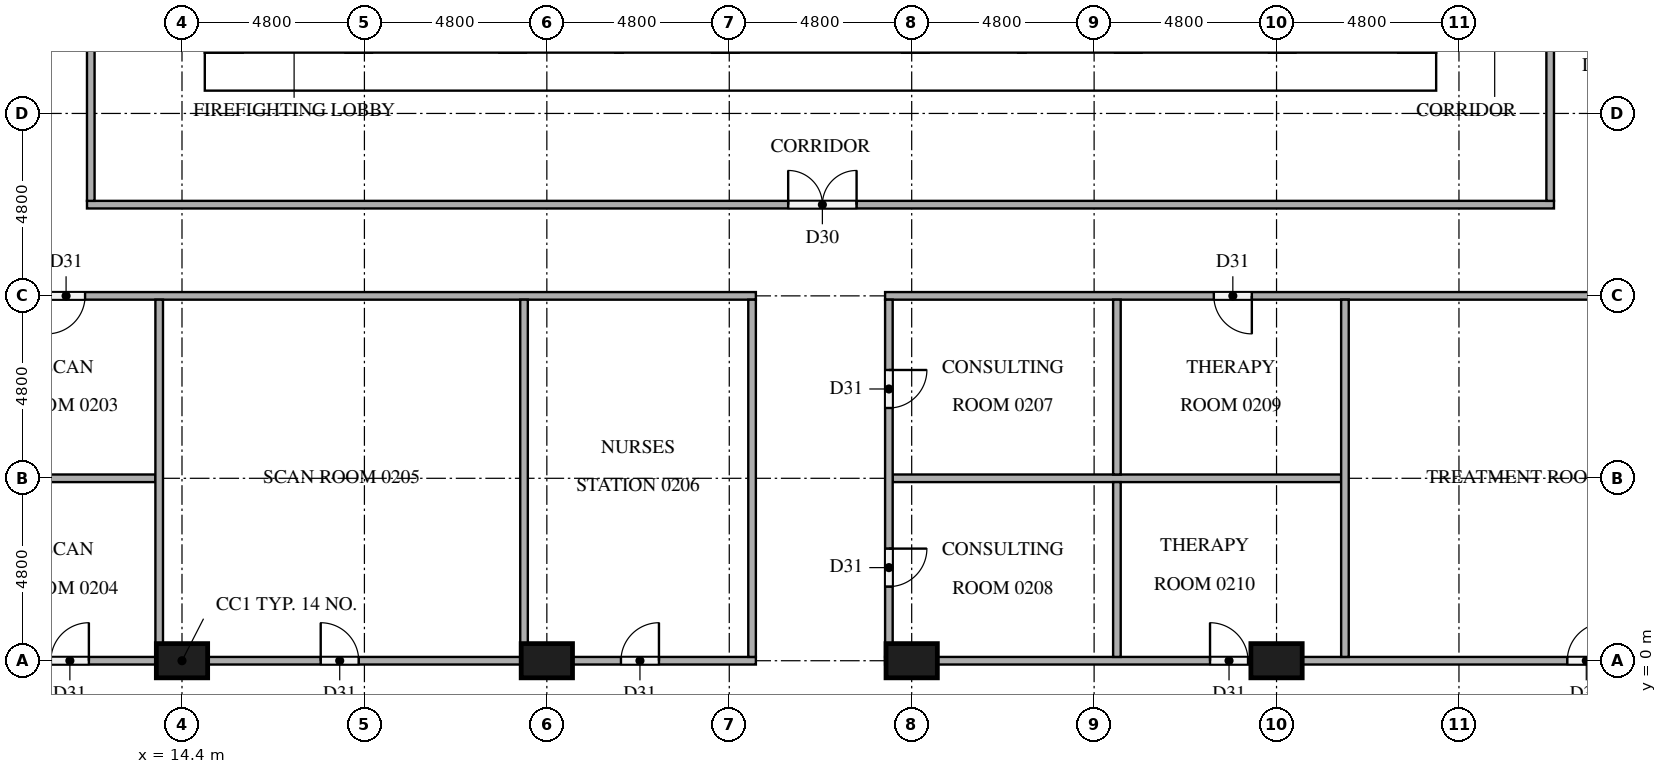
"""IFC4 building model, lengths in metres.
Left out: names, types, materials, properties, quantities, classifications, styles, units other than length and angle.
Written with IfcOpenShell. Run it as: python <this file> out.ifc"""

import sys

from ifc_helpers import new_model, si_unit, direction, frame, frame_2d, origin, origin_2d, place, context, subcontext, project, spatial, rectangle, extrude, element, fill, save


model = new_model("IFC4")
c1 = context("Model", 3, precision=1e-05, world=origin(), true_north=direction((0.0, 1.0)))
c2 = subcontext(c1, "Body", "Model", "MODEL_VIEW")
j1 = project(units=[si_unit("LENGTHUNIT", "METRE"), si_unit("PLANEANGLEUNIT", "RADIAN")], contexts=[c1])
p1 = place(None, origin())
s1 = spatial("IfcSite", under=j1, at=p1, CompositionType="ELEMENT")
p2 = place(p1, origin())
s2 = spatial("IfcBuilding", under=s1, at=p2, CompositionType="ELEMENT")
p3 = place(p2, frame((0.0, 0.0, 10.5)))
s3 = spatial("IfcBuildingStorey", under=s2, at=p3, CompositionType="ELEMENT", Elevation=10.5)
p4 = place(p3, frame((15.0, 15.5, 0.0), z_axis=(0.0, 0.0, 1.0), x_axis=(1.0, 0.0, 0.0)))
e1 = element("IfcWall", 1, at=p4, inside=s3, PredefinedType="SHEAR", context=c2, shape_type="SweptSolid", body=[
    extrude(rectangle(XDim=32.4, YDim=1.0, at=frame_2d((16.2, 0.0))), origin(), (0.0, 0.0, 1.0), 4.2),
])
p5 = place(p4, frame((15.3, 0.0, 0.0)))
e2 = element("IfcOpeningElement", 2, at=p5, cuts=e1, PredefinedType="OPENING", context=c2, shape_type="SweptSolid", body=[
    extrude(rectangle(XDim=1.8, YDim=2.1, at=frame_2d((0.9, 1.05))), frame((0.0, 0.51, 0.0), z_axis=(0.0, -1.0, 0.0), x_axis=(1.0, 0.0, 0.0)), (0.0, 0.0, 1.0), 1.02),
])
p6 = place(p3, frame((15.5, 16.0, 0.0), z_axis=(0.0, 0.0, 1.0), x_axis=(0.0, 1.0, 0.0)))
e3 = element("IfcWall", 3, at=p6, inside=s3, PredefinedType="SHEAR", context=c2, shape_type="SweptSolid", body=[
    extrude(rectangle(XDim=20.8, YDim=1.0, at=frame_2d((10.4, 0.0))), origin(), (0.0, 0.0, 1.0), 4.2),
])
p7 = place(p6, frame((4.76, 0.0, 0.0)))
e4 = element("IfcOpeningElement", 4, at=p7, cuts=e3, PredefinedType="OPENING", context=c2, shape_type="SweptSolid", body=[
    extrude(rectangle(XDim=1.2, YDim=2.1, at=frame_2d((0.6, 1.05))), frame((0.0, 0.51, 0.0), z_axis=(0.0, -1.0, 0.0), x_axis=(1.0, 0.0, 0.0)), (0.0, 0.0, 1.0), 1.02),
])
p8 = place(p3, frame((46.9, 16.0, 0.0), z_axis=(0.0, 0.0, 1.0), x_axis=(0.0, 1.0, 0.0)))
e5 = element("IfcWall", 5, at=p8, inside=s3, PredefinedType="SHEAR", context=c2, shape_type="SweptSolid", body=[
    extrude(rectangle(XDim=20.8, YDim=1.0, at=frame_2d((10.4, 0.0))), origin(), (0.0, 0.0, 1.0), 4.2),
])
p9 = place(p8, frame((10.1, 0.0, 0.0)))
e6 = element("IfcOpeningElement", 6, at=p9, cuts=e5, PredefinedType="OPENING", context=c2, shape_type="SweptSolid", body=[
    extrude(rectangle(XDim=1.2, YDim=2.1, at=frame_2d((0.6, 1.05))), frame((0.0, 0.51, 0.0), z_axis=(0.0, -1.0, 0.0), x_axis=(1.0, 0.0, 0.0)), (0.0, 0.0, 1.0), 1.02),
])
p10 = place(p3, frame((23.1, 16.0, 0.0), z_axis=(0.0, 0.0, 1.0), x_axis=(0.0, 1.0, 0.0)))
e7 = element("IfcWall", 7, at=p10, inside=s3, PredefinedType="SHEAR", context=c2, shape_type="SweptSolid", body=[
    extrude(rectangle(XDim=20.8, YDim=0.7, at=frame_2d((10.4, 0.0))), origin(), (0.0, 0.0, 1.0), 4.2),
])
for number, where, z_axis, x_axis in (
    (8, (14.4, 0.0, 0.0), (0.0, 0.0, 1.0), (1.0, 0.0, 0.0)),
    (9, (24.0, 0.0, 0.0), (0.0, 0.0, 1.0), (1.0, 0.0, 0.0)),
    (10, (33.6, 0.0, 0.0), (0.0, 0.0, 1.0), (1.0, 0.0, 0.0)),
    (11, (43.2, 0.0, 0.0), (0.0, 0.0, 1.0), (1.0, 0.0, 0.0)),
):
    element("IfcColumn", number, at=place(p3, frame(where, z_axis=z_axis, x_axis=x_axis)), inside=s3, PredefinedType="COLUMN", context=c2, shape_type="SweptSolid", body=[
        extrude(rectangle(XDim=1.35, YDim=0.9, at=origin_2d()), origin(), (0.0, 0.0, 1.0), 4.2),
    ])
p11 = place(p3, frame((-1.85, 0.0, 0.0), z_axis=(0.0, 0.0, 1.0), x_axis=(1.0, 0.0, 0.0)))
e12 = element("IfcWall", 12, at=p11, inside=s3, PredefinedType="PARTITIONING", context=c2, shape_type="SweptSolid", body=[
    extrude(rectangle(XDim=31.35, YDim=0.2, at=frame_2d((15.675, 0.0))), origin(), (0.0, 0.0, 1.0), 4.2),
])
p12 = place(p11, frame((12.8, 0.0, 0.0)))
e13 = element("IfcOpeningElement", 13, at=p12, cuts=e12, PredefinedType="OPENING", context=c2, shape_type="SweptSolid", body=[
    extrude(rectangle(XDim=1.0, YDim=2.1, at=frame_2d((0.5, 1.05))), frame((0.0, 0.11, 0.0), z_axis=(0.0, -1.0, 0.0), x_axis=(1.0, 0.0, 0.0)), (0.0, 0.0, 1.0), 0.22),
])
p13 = place(p11, frame((19.9, 0.0, 0.0)))
e14 = element("IfcOpeningElement", 14, at=p13, cuts=e12, PredefinedType="OPENING", context=c2, shape_type="SweptSolid", body=[
    extrude(rectangle(XDim=1.0, YDim=2.1, at=frame_2d((0.5, 1.05))), frame((0.0, 0.11, 0.0), z_axis=(0.0, -1.0, 0.0), x_axis=(1.0, 0.0, 0.0)), (0.0, 0.0, 1.0), 0.22),
])
p14 = place(p11, frame((27.8, 0.0, 0.0)))
e15 = element("IfcOpeningElement", 15, at=p14, cuts=e12, PredefinedType="OPENING", context=c2, shape_type="SweptSolid", body=[
    extrude(rectangle(XDim=1.0, YDim=2.1, at=frame_2d((0.5, 1.05))), frame((0.0, 0.11, 0.0), z_axis=(0.0, -1.0, 0.0), x_axis=(1.0, 0.0, 0.0)), (0.0, 0.0, 1.0), 0.22),
])
p15 = place(p3, frame((32.9, 0.0, 0.0), z_axis=(0.0, 0.0, 1.0), x_axis=(1.0, 0.0, 0.0)))
e16 = element("IfcWall", 16, at=p15, inside=s3, PredefinedType="PARTITIONING", context=c2, shape_type="SweptSolid", body=[
    extrude(rectangle(XDim=34.4, YDim=0.2, at=frame_2d((17.2, 0.0))), origin(), (0.0, 0.0, 1.0), 4.2),
])
p16 = place(p15, frame((8.55, 0.0, 0.0)))
e17 = element("IfcOpeningElement", 17, at=p16, cuts=e16, PredefinedType="OPENING", context=c2, shape_type="SweptSolid", body=[
    extrude(rectangle(XDim=1.0, YDim=2.1, at=frame_2d((0.5, 1.05))), frame((0.0, 0.11, 0.0), z_axis=(0.0, -1.0, 0.0), x_axis=(1.0, 0.0, 0.0)), (0.0, 0.0, 1.0), 0.22),
])
p17 = place(p15, frame((17.95, 0.0, 0.0)))
e18 = element("IfcOpeningElement", 18, at=p17, cuts=e16, PredefinedType="OPENING", context=c2, shape_type="SweptSolid", body=[
    extrude(rectangle(XDim=1.0, YDim=2.1, at=frame_2d((0.5, 1.05))), frame((0.0, 0.11, 0.0), z_axis=(0.0, -1.0, 0.0), x_axis=(1.0, 0.0, 0.0)), (0.0, 0.0, 1.0), 0.22),
])
p18 = place(p3, frame((9.1, 4.8, 0.0), z_axis=(0.0, 0.0, 1.0), x_axis=(1.0, 0.0, 0.0)))
e19 = element("IfcWall", 19, at=p18, inside=s3, PredefinedType="PARTITIONING", context=c2, shape_type="SweptSolid", body=[
    extrude(rectangle(XDim=4.6, YDim=0.2, at=frame_2d((2.3, 0.0))), origin(), (0.0, 0.0, 1.0), 4.2),
])
p19 = place(p3, frame((33.1, 4.8, 0.0), z_axis=(0.0, 0.0, 1.0), x_axis=(1.0, 0.0, 0.0)))
e20 = element("IfcWall", 20, at=p19, inside=s3, PredefinedType="PARTITIONING", context=c2, shape_type="SweptSolid", body=[
    extrude(rectangle(XDim=11.8, YDim=0.2, at=frame_2d((5.9, 0.0))), origin(), (0.0, 0.0, 1.0), 4.2),
])
p20 = place(p3, frame((29.5, 9.6, 0.0), z_axis=(0.0, 0.0, 1.0), x_axis=(-1.0, 0.0, 0.0)))
e21 = element("IfcWall", 21, at=p20, inside=s3, PredefinedType="PARTITIONING", context=c2, shape_type="SweptSolid", body=[
    extrude(rectangle(XDim=34.4, YDim=0.2, at=frame_2d((17.2, 0.0))), origin(), (0.0, 0.0, 1.0), 4.2),
])
p21 = place(p20, frame((31.45, 0.0, 0.0)))
e22 = element("IfcOpeningElement", 22, at=p21, cuts=e21, PredefinedType="OPENING", context=c2, shape_type="SweptSolid", body=[
    extrude(rectangle(XDim=1.0, YDim=2.1, at=frame_2d((0.5, 1.05))), frame((0.0, 0.11, 0.0), z_axis=(0.0, -1.0, 0.0), x_axis=(1.0, 0.0, 0.0)), (0.0, 0.0, 1.0), 0.22),
])
p22 = place(p20, frame((24.45, 0.0, 0.0)))
e23 = element("IfcOpeningElement", 23, at=p22, cuts=e21, PredefinedType="OPENING", context=c2, shape_type="SweptSolid", body=[
    extrude(rectangle(XDim=1.0, YDim=2.1, at=frame_2d((0.5, 1.05))), frame((0.0, 0.11, 0.0), z_axis=(0.0, -1.0, 0.0), x_axis=(1.0, 0.0, 0.0)), (0.0, 0.0, 1.0), 0.22),
])
p23 = place(p20, frame((17.65, 0.0, 0.0)))
e24 = element("IfcOpeningElement", 24, at=p23, cuts=e21, PredefinedType="OPENING", context=c2, shape_type="SweptSolid", body=[
    extrude(rectangle(XDim=1.0, YDim=2.1, at=frame_2d((0.5, 1.05))), frame((0.0, 0.11, 0.0), z_axis=(0.0, -1.0, 0.0), x_axis=(1.0, 0.0, 0.0)), (0.0, 0.0, 1.0), 0.22),
])
p24 = place(p3, frame((65.65, 9.6, 0.0), z_axis=(0.0, 0.0, 1.0), x_axis=(-1.0, 0.0, 0.0)))
e25 = element("IfcWall", 25, at=p24, inside=s3, PredefinedType="PARTITIONING", context=c2, shape_type="SweptSolid", body=[
    extrude(rectangle(XDim=32.75, YDim=0.2, at=frame_2d((16.375, 0.0))), origin(), (0.0, 0.0, 1.0), 4.2),
])
p25 = place(p24, frame((23.1, 0.0, 0.0)))
e26 = element("IfcOpeningElement", 26, at=p25, cuts=e25, PredefinedType="OPENING", context=c2, shape_type="SweptSolid", body=[
    extrude(rectangle(XDim=1.0, YDim=2.1, at=frame_2d((0.5, 1.05))), frame((0.0, 0.11, 0.0), z_axis=(0.0, -1.0, 0.0), x_axis=(1.0, 0.0, 0.0)), (0.0, 0.0, 1.0), 0.22),
])
p26 = place(p3, frame((11.9, 12.0, 0.0), z_axis=(0.0, 0.0, 1.0), x_axis=(1.0, 0.0, 0.0)))
e27 = element("IfcWall", 27, at=p26, inside=s3, PredefinedType="PARTITIONING", context=c2, shape_type="SweptSolid", body=[
    extrude(rectangle(XDim=38.6, YDim=0.2, at=frame_2d((19.3, 0.0))), origin(), (0.0, 0.0, 1.0), 4.2),
])
p27 = place(p26, frame((18.45, 0.0, 0.0)))
e28 = element("IfcOpeningElement", 28, at=p27, cuts=e27, PredefinedType="OPENING", context=c2, shape_type="SweptSolid", body=[
    extrude(rectangle(XDim=1.8, YDim=2.1, at=frame_2d((0.9, 1.05))), frame((0.0, 0.11, 0.0), z_axis=(0.0, -1.0, 0.0), x_axis=(1.0, 0.0, 0.0)), (0.0, 0.0, 1.0), 0.22),
])
p28 = place(p3, frame((12.0, 40.7, 0.0), z_axis=(0.0, 0.0, 1.0), x_axis=(0.0, -1.0, 0.0)))
e29 = element("IfcWall", 29, at=p28, inside=s3, PredefinedType="PARTITIONING", context=c2, shape_type="SweptSolid", body=[
    extrude(rectangle(XDim=28.6, YDim=0.2, at=frame_2d((14.3, 0.0))), origin(), (0.0, 0.0, 1.0), 4.2),
])
p29 = place(p28, frame((6.85, 0.0, 0.0)))
e30 = element("IfcOpeningElement", 30, at=p29, cuts=e29, PredefinedType="OPENING", context=c2, shape_type="SweptSolid", body=[
    extrude(rectangle(XDim=1.8, YDim=2.1, at=frame_2d((0.9, 1.05))), frame((0.0, 0.11, 0.0), z_axis=(0.0, -1.0, 0.0), x_axis=(1.0, 0.0, 0.0)), (0.0, 0.0, 1.0), 0.22),
])
for number, where, z_axis, x_axis in (
    (31, (13.8, 0.1, 0.0), (0.0, 0.0, 1.0), (0.0, 1.0, 0.0)),
    (32, (23.4, 0.1, 0.0), (0.0, 0.0, 1.0), (0.0, 1.0, 0.0)),
    (33, (29.4, 0.1, 0.0), (0.0, 0.0, 1.0), (0.0, 1.0, 0.0)),
):
    element("IfcWall", number, at=place(p3, frame(where, z_axis=z_axis, x_axis=x_axis)), inside=s3, PredefinedType="PARTITIONING", context=c2, shape_type="SweptSolid", body=[
        extrude(rectangle(XDim=9.4, YDim=0.2, at=frame_2d((4.7, 0.0))), origin(), (0.0, 0.0, 1.0), 4.2),
    ])
p30 = place(p3, frame((33.0, 9.5, 0.0), z_axis=(0.0, 0.0, 1.0), x_axis=(0.0, -1.0, 0.0)))
e34 = element("IfcWall", 34, at=p30, inside=s3, PredefinedType="PARTITIONING", context=c2, shape_type="SweptSolid", body=[
    extrude(rectangle(XDim=9.4, YDim=0.2, at=frame_2d((4.7, 0.0))), origin(), (0.0, 0.0, 1.0), 4.2),
])
p31 = place(p30, frame((1.85, 0.0, 0.0)))
e35 = element("IfcOpeningElement", 35, at=p31, cuts=e34, PredefinedType="OPENING", context=c2, shape_type="SweptSolid", body=[
    extrude(rectangle(XDim=1.0, YDim=2.1, at=frame_2d((0.5, 1.05))), frame((0.0, 0.11, 0.0), z_axis=(0.0, -1.0, 0.0), x_axis=(1.0, 0.0, 0.0)), (0.0, 0.0, 1.0), 0.22),
])
p32 = place(p30, frame((6.55, 0.0, 0.0)))
e36 = element("IfcOpeningElement", 36, at=p32, cuts=e34, PredefinedType="OPENING", context=c2, shape_type="SweptSolid", body=[
    extrude(rectangle(XDim=1.0, YDim=2.1, at=frame_2d((0.5, 1.05))), frame((0.0, 0.11, 0.0), z_axis=(0.0, -1.0, 0.0), x_axis=(1.0, 0.0, 0.0)), (0.0, 0.0, 1.0), 0.22),
])
p33 = place(p3, frame((39.0, 0.1, 0.0), z_axis=(0.0, 0.0, 1.0), x_axis=(0.0, 1.0, 0.0)))
e37 = element("IfcWall", 37, at=p33, inside=s3, PredefinedType="PARTITIONING", context=c2, shape_type="SweptSolid", body=[
    extrude(rectangle(XDim=4.6, YDim=0.2, at=frame_2d((2.3, 0.0))), origin(), (0.0, 0.0, 1.0), 4.2),
])
p34 = place(p3, frame((39.0, 4.9, 0.0), z_axis=(0.0, 0.0, 1.0), x_axis=(0.0, 1.0, 0.0)))
e38 = element("IfcWall", 38, at=p34, inside=s3, PredefinedType="PARTITIONING", context=c2, shape_type="SweptSolid", body=[
    extrude(rectangle(XDim=4.6, YDim=0.2, at=frame_2d((2.3, 0.0))), origin(), (0.0, 0.0, 1.0), 4.2),
])
p35 = place(p3, frame((45.0, 0.1, 0.0), z_axis=(0.0, 0.0, 1.0), x_axis=(0.0, 1.0, 0.0)))
e39 = element("IfcWall", 39, at=p35, inside=s3, PredefinedType="PARTITIONING", context=c2, shape_type="SweptSolid", body=[
    extrude(rectangle(XDim=9.4, YDim=0.2, at=frame_2d((4.7, 0.0))), origin(), (0.0, 0.0, 1.0), 4.2),
])
p36 = place(p3, frame((50.4, 12.1, 0.0), z_axis=(0.0, 0.0, 1.0), x_axis=(0.0, 1.0, 0.0)))
e40 = element("IfcWall", 40, at=p36, inside=s3, PredefinedType="PARTITIONING", context=c2, shape_type="SweptSolid", body=[
    extrude(rectangle(XDim=28.6, YDim=0.2, at=frame_2d((14.3, 0.0))), origin(), (0.0, 0.0, 1.0), 4.2),
])
p37 = place(p36, frame((20.05, 0.0, 0.0)))
e41 = element("IfcOpeningElement", 41, at=p37, cuts=e40, PredefinedType="OPENING", context=c2, shape_type="SweptSolid", body=[
    extrude(rectangle(XDim=1.8, YDim=2.1, at=frame_2d((0.9, 1.05))), frame((0.0, 0.11, 0.0), z_axis=(0.0, -1.0, 0.0), x_axis=(1.0, 0.0, 0.0)), (0.0, 0.0, 1.0), 0.22),
])
p38 = place(p5, frame((1.8, 0.0, 0.0), z_axis=(0.0, 0.0, 1.0), x_axis=(-1.0, 0.0, 0.0)))
e42 = element("IfcDoor", 42, at=p38, inside=s3, OperationType="DOUBLE_DOOR_SINGLE_SWING", PredefinedType="DOOR", context=c2, shape_type="SweptSolid", body=[
    extrude(rectangle(XDim=1.8, YDim=2.1, at=frame_2d((0.9, 1.05))), frame((0.0, 0.025, 0.0), z_axis=(0.0, -1.0, 0.0), x_axis=(1.0, 0.0, 0.0)), (0.0, 0.0, 1.0), 0.05),
])
fill(e2, e42)
p39 = place(p23, origin())
e43 = element("IfcDoor", 43, at=p39, inside=s3, OperationType="SINGLE_SWING_RIGHT", PredefinedType="DOOR", context=c2, shape_type="SweptSolid", body=[
    extrude(rectangle(XDim=1.0, YDim=2.1, at=frame_2d((0.5, 1.05))), frame((0.0, 0.025, 0.0), z_axis=(0.0, -1.0, 0.0), x_axis=(1.0, 0.0, 0.0)), (0.0, 0.0, 1.0), 0.05),
])
fill(e24, e43)
p40 = place(p12, origin())
e44 = element("IfcDoor", 44, at=p40, inside=s3, OperationType="SINGLE_SWING_RIGHT", PredefinedType="DOOR", context=c2, shape_type="SweptSolid", body=[
    extrude(rectangle(XDim=1.0, YDim=2.1, at=frame_2d((0.5, 1.05))), frame((0.0, 0.025, 0.0), z_axis=(0.0, -1.0, 0.0), x_axis=(1.0, 0.0, 0.0)), (0.0, 0.0, 1.0), 0.05),
])
fill(e13, e44)
p41 = place(p13, origin())
e45 = element("IfcDoor", 45, at=p41, inside=s3, OperationType="SINGLE_SWING_LEFT", PredefinedType="DOOR", context=c2, shape_type="SweptSolid", body=[
    extrude(rectangle(XDim=1.0, YDim=2.1, at=frame_2d((0.5, 1.05))), frame((0.0, 0.025, 0.0), z_axis=(0.0, -1.0, 0.0), x_axis=(1.0, 0.0, 0.0)), (0.0, 0.0, 1.0), 0.05),
])
fill(e14, e45)
p42 = place(p14, origin())
e46 = element("IfcDoor", 46, at=p42, inside=s3, OperationType="SINGLE_SWING_RIGHT", PredefinedType="DOOR", context=c2, shape_type="SweptSolid", body=[
    extrude(rectangle(XDim=1.0, YDim=2.1, at=frame_2d((0.5, 1.05))), frame((0.0, 0.025, 0.0), z_axis=(0.0, -1.0, 0.0), x_axis=(1.0, 0.0, 0.0)), (0.0, 0.0, 1.0), 0.05),
])
fill(e15, e46)
p43 = place(p31, origin())
e47 = element("IfcDoor", 47, at=p43, inside=s3, OperationType="SINGLE_SWING_LEFT", PredefinedType="DOOR", context=c2, shape_type="SweptSolid", body=[
    extrude(rectangle(XDim=1.0, YDim=2.1, at=frame_2d((0.5, 1.05))), frame((0.0, 0.025, 0.0), z_axis=(0.0, -1.0, 0.0), x_axis=(1.0, 0.0, 0.0)), (0.0, 0.0, 1.0), 0.05),
])
fill(e35, e47)
p44 = place(p32, origin())
e48 = element("IfcDoor", 48, at=p44, inside=s3, OperationType="SINGLE_SWING_LEFT", PredefinedType="DOOR", context=c2, shape_type="SweptSolid", body=[
    extrude(rectangle(XDim=1.0, YDim=2.1, at=frame_2d((0.5, 1.05))), frame((0.0, 0.025, 0.0), z_axis=(0.0, -1.0, 0.0), x_axis=(1.0, 0.0, 0.0)), (0.0, 0.0, 1.0), 0.05),
])
fill(e36, e48)
p45 = place(p25, origin())
e49 = element("IfcDoor", 49, at=p45, inside=s3, OperationType="SINGLE_SWING_LEFT", PredefinedType="DOOR", context=c2, shape_type="SweptSolid", body=[
    extrude(rectangle(XDim=1.0, YDim=2.1, at=frame_2d((0.5, 1.05))), frame((0.0, 0.025, 0.0), z_axis=(0.0, -1.0, 0.0), x_axis=(1.0, 0.0, 0.0)), (0.0, 0.0, 1.0), 0.05),
])
fill(e26, e49)
p46 = place(p16, origin())
e50 = element("IfcDoor", 50, at=p46, inside=s3, OperationType="SINGLE_SWING_LEFT", PredefinedType="DOOR", context=c2, shape_type="SweptSolid", body=[
    extrude(rectangle(XDim=1.0, YDim=2.1, at=frame_2d((0.5, 1.05))), frame((0.0, 0.025, 0.0), z_axis=(0.0, -1.0, 0.0), x_axis=(1.0, 0.0, 0.0)), (0.0, 0.0, 1.0), 0.05),
])
fill(e17, e50)
p47 = place(p17, origin())
e51 = element("IfcDoor", 51, at=p47, inside=s3, OperationType="SINGLE_SWING_RIGHT", PredefinedType="DOOR", context=c2, shape_type="SweptSolid", body=[
    extrude(rectangle(XDim=1.0, YDim=2.1, at=frame_2d((0.5, 1.05))), frame((0.0, 0.025, 0.0), z_axis=(0.0, -1.0, 0.0), x_axis=(1.0, 0.0, 0.0)), (0.0, 0.0, 1.0), 0.05),
])
fill(e18, e51)
p48 = place(p27, origin())
e52 = element("IfcDoor", 52, at=p48, inside=s3, OperationType="DOUBLE_DOOR_SINGLE_SWING", PredefinedType="DOOR", context=c2, shape_type="SweptSolid", body=[
    extrude(rectangle(XDim=1.8, YDim=2.1, at=frame_2d((0.9, 1.05))), frame((0.0, 0.025, 0.0), z_axis=(0.0, -1.0, 0.0), x_axis=(1.0, 0.0, 0.0)), (0.0, 0.0, 1.0), 0.05),
])
fill(e28, e52)
save(model, sys.argv[1])
